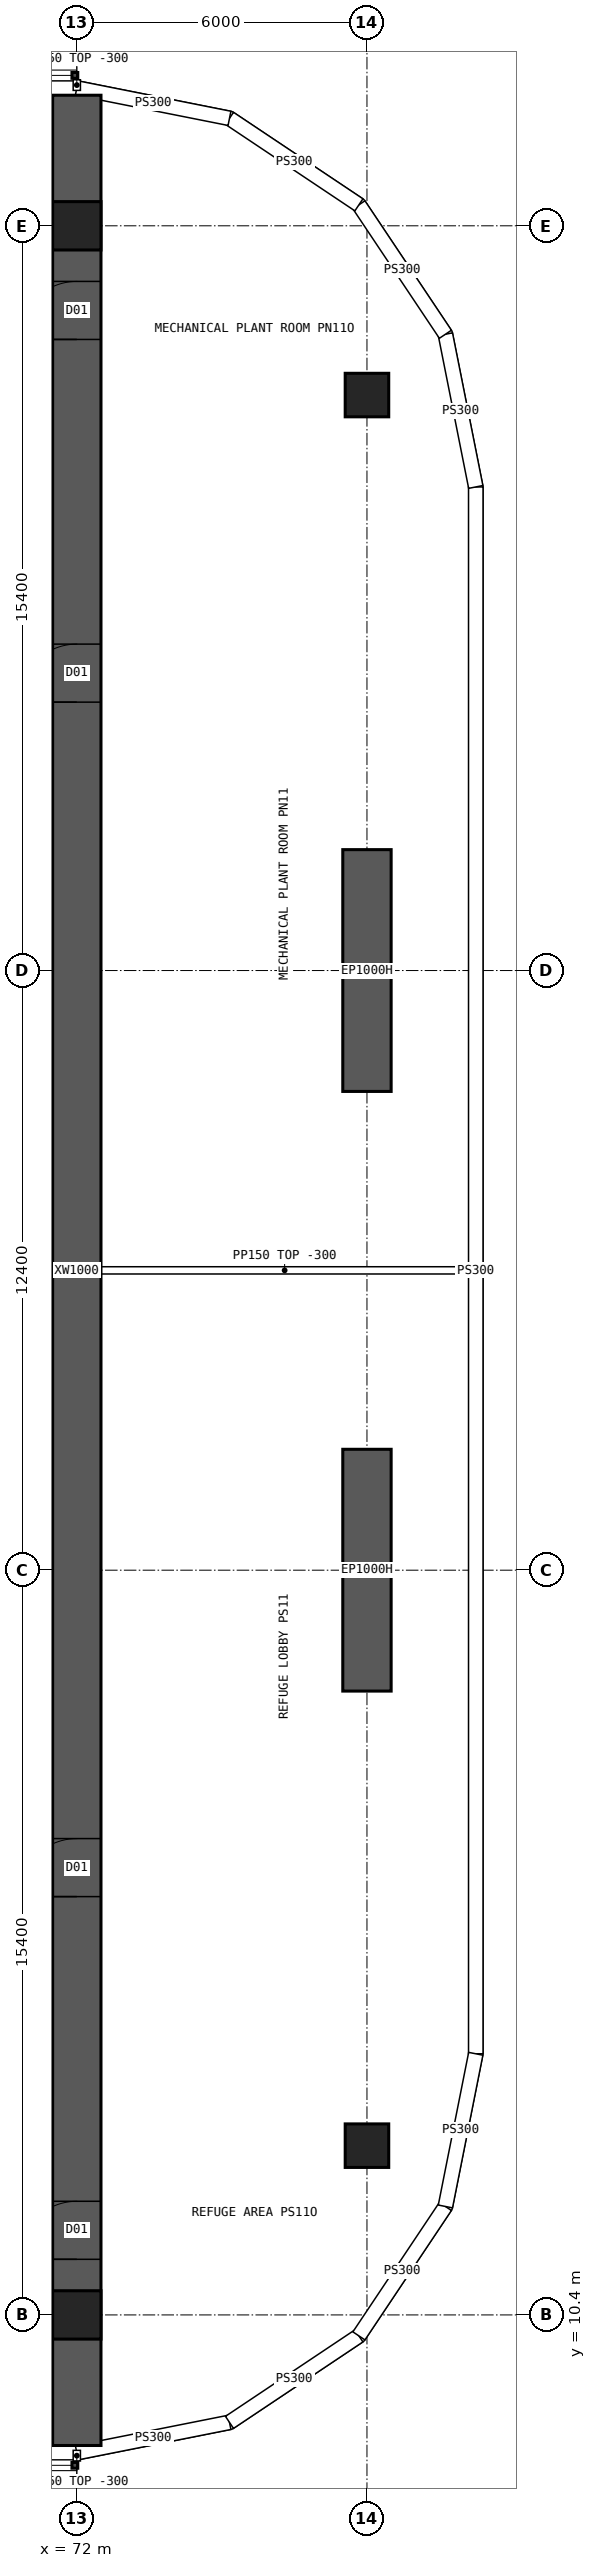
"""IFC4 building model, lengths in metres.
Left out: names, types, materials, properties, quantities, classifications, styles, units other than length and angle.
Written with IfcOpenShell. Run it as: python <this file> out.ifc"""

import sys

from ifc_helpers import new_model, si_unit, direction, frame, frame_2d, origin, origin_2d, place, context, subcontext, project, spatial, polyline, rectangle, hollow_rectangle, outline, extrude, element, fill, save


model = new_model("IFC4")
c1 = context("Model", 3, precision=1e-05, world=origin(), true_north=direction((0.0, 1.0)))
c2 = subcontext(c1, "Body", "Model", "MODEL_VIEW")
j1 = project(units=[si_unit("LENGTHUNIT", "METRE"), si_unit("PLANEANGLEUNIT", "RADIAN")], contexts=[c1])
p1 = place(None, origin())
s1 = spatial("IfcSite", under=j1, at=p1, CompositionType="ELEMENT")
p2 = place(p1, origin())
s2 = spatial("IfcBuilding", under=s1, at=p2, CompositionType="ELEMENT")
p3 = place(p2, frame((0.0, 0.0, 68.95)))
s3 = spatial("IfcBuildingStorey", under=s2, at=p3, CompositionType="ELEMENT", Elevation=68.95)
for number, where, z_axis, x_axis in (
    (1, (72.0, 10.4, 0.0), (0.0, 0.0, 1.0), (1.0, 0.0, 0.0)),
    (2, (72.0, 53.6, 0.0), (0.0, 0.0, 1.0), (1.0, 0.0, 0.0)),
):
    element("IfcColumn", number, at=place(p3, frame(where, z_axis=z_axis, x_axis=x_axis)), inside=s3, PredefinedType="COLUMN", context=c2, shape_type="SweptSolid", body=[
        extrude(hollow_rectangle(XDim=1.0, YDim=1.0, WallThickness=0.1, at=origin_2d()), origin(), (0.0, 0.0, 1.0), 7.2),
    ])
for number, where, z_axis, x_axis in (
    (3, (78.0, 13.9, 0.0), (0.0, 0.0, 1.0), (1.0, 0.0, 0.0)),
    (4, (78.0, 50.1, 0.0), (0.0, 0.0, 1.0), (1.0, 0.0, 0.0)),
):
    element("IfcColumn", number, at=place(p3, frame(where, z_axis=z_axis, x_axis=x_axis)), inside=s3, PredefinedType="COLUMN", context=c2, shape_type="SweptSolid", body=[
        extrude(hollow_rectangle(XDim=0.9, YDim=0.9, WallThickness=0.09, at=origin_2d()), origin(), (0.0, 0.0, 1.0), 7.2),
    ])
for number, where, z_axis, x_axis in (
    (5, (78.0, 23.3, 0.0), (0.0, 0.0, 1.0), (0.0, 1.0, 0.0)),
    (6, (78.0, 35.7, 0.0), (0.0, 0.0, 1.0), (0.0, 1.0, 0.0)),
):
    element("IfcWall", number, at=place(p3, frame(where, z_axis=z_axis, x_axis=x_axis)), inside=s3, PredefinedType="SHEAR", context=c2, shape_type="SweptSolid", body=[
        extrude(rectangle(XDim=5.0, YDim=1.0, at=frame_2d((2.5, 0.0))), origin(), (0.0, 0.0, 1.0), 7.2),
    ])
p4 = place(p3, frame((72.0, 7.7, 0.0), z_axis=(0.0, 0.0, 1.0), x_axis=(0.0, 1.0, 0.0)))
e7 = element("IfcWall", 7, at=p4, inside=s3, PredefinedType="SHEAR", context=c2, shape_type="SweptSolid", body=[
    extrude(rectangle(XDim=48.6, YDim=1.0, at=frame_2d((24.3, 0.0))), origin(), (0.0, 0.0, 1.0), 7.2),
])
p5 = place(p4, frame((3.85, 0.0, 0.0)))
e8 = element("IfcOpeningElement", 8, at=p5, cuts=e7, PredefinedType="OPENING", context=c2, shape_type="SweptSolid", body=[
    extrude(rectangle(XDim=1.2, YDim=2.1, at=frame_2d((0.6, 1.05))), frame((0.0, 0.51, 0.0), z_axis=(0.0, -1.0, 0.0), x_axis=(1.0, 0.0, 0.0)), (0.0, 0.0, 1.0), 1.02),
])
p6 = place(p4, frame((11.35, 0.0, 0.0)))
e9 = element("IfcOpeningElement", 9, at=p6, cuts=e7, PredefinedType="OPENING", context=c2, shape_type="SweptSolid", body=[
    extrude(rectangle(XDim=1.2, YDim=2.1, at=frame_2d((0.6, 1.05))), frame((0.0, 0.51, 0.0), z_axis=(0.0, -1.0, 0.0), x_axis=(1.0, 0.0, 0.0)), (0.0, 0.0, 1.0), 1.02),
])
p7 = place(p4, frame((43.55, 0.0, 0.0)))
e10 = element("IfcOpeningElement", 10, at=p7, cuts=e7, PredefinedType="OPENING", context=c2, shape_type="SweptSolid", body=[
    extrude(rectangle(XDim=1.2, YDim=2.1, at=frame_2d((0.6, 1.05))), frame((0.0, 0.51, 0.0), z_axis=(0.0, -1.0, 0.0), x_axis=(1.0, 0.0, 0.0)), (0.0, 0.0, 1.0), 1.02),
])
p8 = place(p4, frame((36.05, 0.0, 0.0)))
e11 = element("IfcOpeningElement", 11, at=p8, cuts=e7, PredefinedType="OPENING", context=c2, shape_type="SweptSolid", body=[
    extrude(rectangle(XDim=1.2, YDim=2.1, at=frame_2d((0.6, 1.05))), frame((0.0, 0.51, 0.0), z_axis=(0.0, -1.0, 0.0), x_axis=(1.0, 0.0, 0.0)), (0.0, 0.0, 1.0), 1.02),
])
p9 = place(p3, frame((80.25, 15.8, 0.0), z_axis=(0.0, 0.0, 1.0), x_axis=(0.0, 1.0, 0.0)))
e12 = element("IfcWall", 12, at=p9, inside=s3, PredefinedType="SOLIDWALL", context=c2, shape_type="SweptSolid", body=[
    extrude(outline(polyline([(-0.015, -0.15), (32.415, -0.15), (32.385, 0.15), (0.015, 0.15), (-0.015, -0.15)])), origin(), (0.0, 0.0, 1.0), 6.9),
])
p10 = place(p3, frame((72.0, 7.55, 0.0), z_axis=(0.0, 0.0, 1.0), x_axis=(0.980787251524, 0.195080412259, 0.0)))
e13 = element("IfcWall", 13, at=p10, inside=s3, PredefinedType="SOLIDWALL", context=c2, shape_type="SweptSolid", body=[
    extrude(outline(polyline([(-0.03, -0.15), (3.249, -0.15), (3.189, 0.15), (0.03, 0.15), (-0.03, -0.15)])), origin(), (0.0, 0.0, 1.0), 6.9),
])
p11 = place(p3, frame((75.157, 8.178, 0.0), z_axis=(0.0, 0.0, 1.0), x_axis=(0.831478105043, 0.555557522525, 0.0)))
e14 = element("IfcWall", 14, at=p11, inside=s3, PredefinedType="SOLIDWALL", context=c2, shape_type="SweptSolid", body=[
    extrude(outline(polyline([(-0.03, -0.15), (3.249, -0.15), (3.189, 0.15), (0.03, 0.15), (-0.03, -0.15)])), origin(), (0.0, 0.0, 1.0), 6.9),
])
p12 = place(p3, frame((77.833, 9.966, 0.0), z_axis=(0.0, 0.0, 1.0), x_axis=(0.555609954424, 0.831443069936, 0.0)))
e15 = element("IfcWall", 15, at=p12, inside=s3, PredefinedType="SOLIDWALL", context=c2, shape_type="SweptSolid", body=[
    extrude(outline(polyline([(-0.03, -0.15), (3.249, -0.15), (3.189, 0.15), (0.03, 0.15), (-0.03, -0.15)])), origin(), (0.0, 0.0, 1.0), 6.9),
])
p13 = place(p3, frame((79.622, 12.643, 0.0), z_axis=(0.0, 0.0, 1.0), x_axis=(0.195065901187, 0.980790137692, 0.0)))
e16 = element("IfcWall", 16, at=p13, inside=s3, PredefinedType="SOLIDWALL", context=c2, shape_type="SweptSolid", body=[
    extrude(outline(polyline([(-0.03, -0.15), (3.234, -0.15), (3.204, 0.15), (0.03, 0.15), (-0.03, -0.15)])), origin(), (0.0, 0.0, 1.0), 6.9),
])
p14 = place(p3, frame((80.25, 48.2, 0.0), z_axis=(0.0, 0.0, 1.0), x_axis=(-0.195065901187, 0.980790137692, 0.0)))
e17 = element("IfcWall", 17, at=p14, inside=s3, PredefinedType="SOLIDWALL", context=c2, shape_type="SweptSolid", body=[
    extrude(outline(polyline([(-0.015, -0.15), (3.249, -0.15), (3.189, 0.15), (0.015, 0.15), (-0.015, -0.15)])), origin(), (0.0, 0.0, 1.0), 6.9),
])
p15 = place(p3, frame((79.622, 51.357, 0.0), z_axis=(0.0, 0.0, 1.0), x_axis=(-0.555609954424, 0.831443069936, 0.0)))
e18 = element("IfcWall", 18, at=p15, inside=s3, PredefinedType="SOLIDWALL", context=c2, shape_type="SweptSolid", body=[
    extrude(outline(polyline([(-0.03, -0.15), (3.249, -0.15), (3.189, 0.15), (0.03, 0.15), (-0.03, -0.15)])), origin(), (0.0, 0.0, 1.0), 6.9),
])
p16 = place(p3, frame((77.833, 54.034, 0.0), z_axis=(0.0, 0.0, 1.0), x_axis=(-0.831478105043, 0.555557522525, 0.0)))
e19 = element("IfcWall", 19, at=p16, inside=s3, PredefinedType="SOLIDWALL", context=c2, shape_type="SweptSolid", body=[
    extrude(outline(polyline([(-0.03, -0.15), (3.249, -0.15), (3.189, 0.15), (0.03, 0.15), (-0.03, -0.15)])), origin(), (0.0, 0.0, 1.0), 6.9),
])
p17 = place(p3, frame((75.157, 55.822, 0.0), z_axis=(0.0, 0.0, 1.0), x_axis=(-0.980787251524, 0.195080412259, 0.0)))
e20 = element("IfcWall", 20, at=p17, inside=s3, PredefinedType="SOLIDWALL", context=c2, shape_type="SweptSolid", body=[
    extrude(outline(polyline([(-0.03, -0.15), (3.249, -0.15), (3.189, 0.15), (0.03, 0.15), (-0.03, -0.15)])), origin(), (0.0, 0.0, 1.0), 6.9),
])
p18 = place(p3, frame((72.5, 32.0, 0.0), z_axis=(0.0, 0.0, 1.0), x_axis=(1.0, 0.0, 0.0)))
e21 = element("IfcWall", 21, at=p18, inside=s3, PredefinedType="PARTITIONING", context=c2, shape_type="SweptSolid", body=[
    extrude(rectangle(XDim=7.595, YDim=0.15, at=frame_2d((3.797, 0.0))), origin(), (0.0, 0.0, 1.0), 6.9),
])
for number, where, z_axis, x_axis in (
    (22, (72.0, 7.6, 0.0), (0.0, 0.0, 1.0), (0.0, -1.0, 0.0)),
    (23, (72.0, 56.4, 0.0), (0.0, 0.0, 1.0), (0.0, 1.0, 0.0)),
):
    element("IfcWall", number, at=place(p3, frame(where, z_axis=z_axis, x_axis=x_axis)), inside=s3, PredefinedType="PARTITIONING", context=c2, shape_type="SweptSolid", body=[
        extrude(rectangle(XDim=0.22, YDim=0.15, at=frame_2d((0.11, 0.0))), origin(), (0.0, 0.0, 1.0), 6.9),
    ])
p19 = place(p5, origin())
e24 = element("IfcDoor", 24, at=p19, inside=s3, OperationType="SINGLE_SWING_LEFT", PredefinedType="DOOR", context=c2, shape_type="SweptSolid", body=[
    extrude(rectangle(XDim=1.2, YDim=2.1, at=frame_2d((0.6, 1.05))), frame((0.0, -0.435, 0.0), z_axis=(0.0, -1.0, 0.0), x_axis=(1.0, 0.0, 0.0)), (0.0, 0.0, 1.0), 0.05),
])
fill(e8, e24)
p20 = place(p6, origin())
e25 = element("IfcDoor", 25, at=p20, inside=s3, OperationType="SINGLE_SWING_LEFT", PredefinedType="DOOR", context=c2, shape_type="SweptSolid", body=[
    extrude(rectangle(XDim=1.2, YDim=2.1, at=frame_2d((0.6, 1.05))), frame((0.0, -0.435, 0.0), z_axis=(0.0, -1.0, 0.0), x_axis=(1.0, 0.0, 0.0)), (0.0, 0.0, 1.0), 0.05),
])
fill(e9, e25)
p21 = place(p7, origin())
e26 = element("IfcDoor", 26, at=p21, inside=s3, OperationType="SINGLE_SWING_LEFT", PredefinedType="DOOR", context=c2, shape_type="SweptSolid", body=[
    extrude(rectangle(XDim=1.2, YDim=2.1, at=frame_2d((0.6, 1.05))), frame((0.0, -0.435, 0.0), z_axis=(0.0, -1.0, 0.0), x_axis=(1.0, 0.0, 0.0)), (0.0, 0.0, 1.0), 0.05),
])
fill(e10, e26)
p22 = place(p8, origin())
e27 = element("IfcDoor", 27, at=p22, inside=s3, OperationType="SINGLE_SWING_LEFT", PredefinedType="DOOR", context=c2, shape_type="SweptSolid", body=[
    extrude(rectangle(XDim=1.2, YDim=2.1, at=frame_2d((0.6, 1.05))), frame((0.0, -0.435, 0.0), z_axis=(0.0, -1.0, 0.0), x_axis=(1.0, 0.0, 0.0)), (0.0, 0.0, 1.0), 0.05),
])
fill(e11, e27)
save(model, sys.argv[1])
